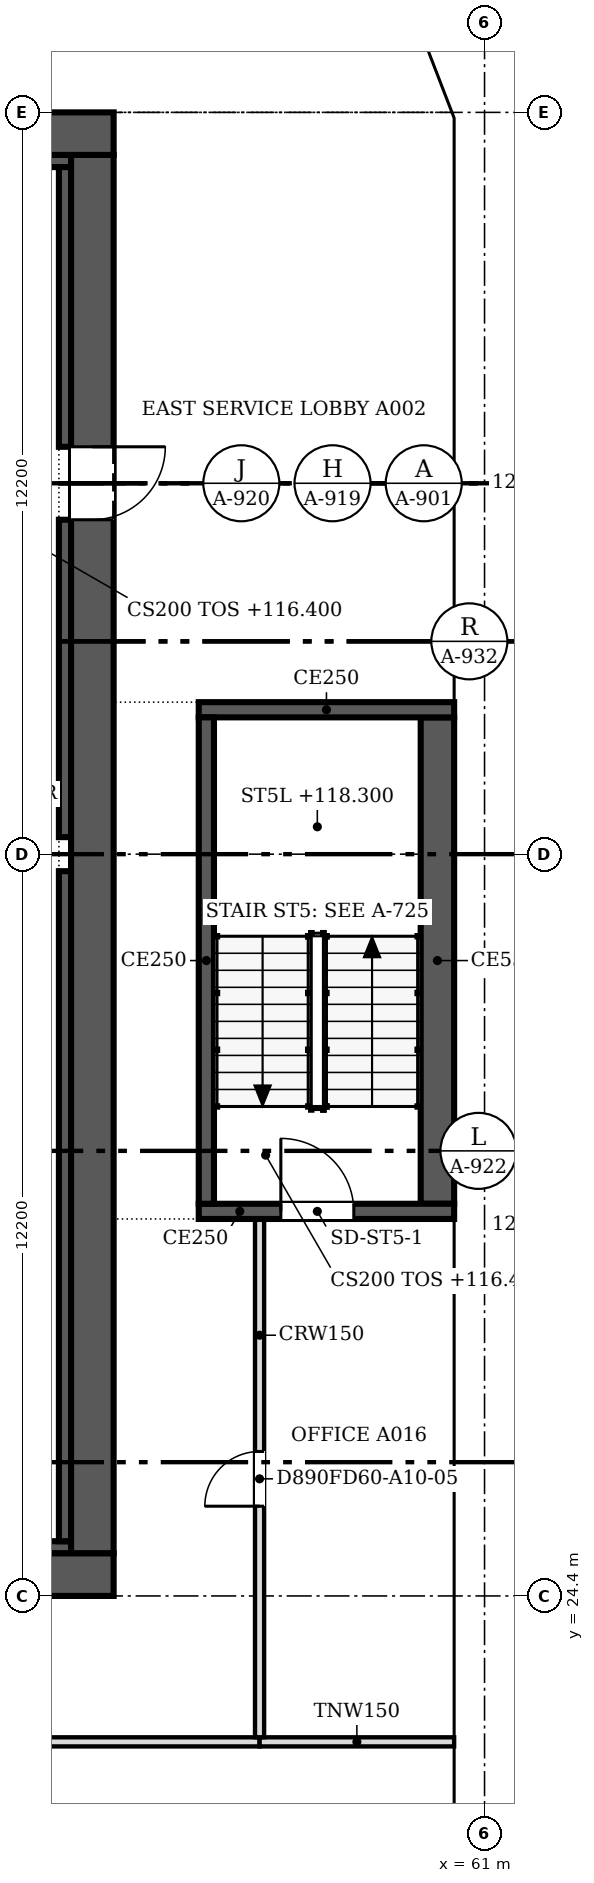
"""IFC4 building model, lengths in metres.
Left out: names, types, materials, properties, quantities, classifications, styles, units other than length and angle.
Written with IfcOpenShell. Run it as: python <this file> out.ifc"""

import sys

from ifc_helpers import new_model, si_unit, direction, frame, frame_2d, origin, place, context, subcontext, project, spatial, polyline, rectangle, outline, extrude, faceted_brep, source, transform, mapped, element, fill, save


model = new_model("IFC4")
c1 = context("Model", 3, precision=1e-05, world=origin(), true_north=direction((0.0, 1.0)))
c2 = subcontext(c1, "Body", "Model", "MODEL_VIEW")
j1 = project(units=[si_unit("LENGTHUNIT", "METRE"), si_unit("PLANEANGLEUNIT", "RADIAN")], contexts=[c1])
p1 = place(None, origin())
s1 = spatial("IfcSite", under=j1, at=p1, CompositionType="ELEMENT")
p2 = place(p1, origin())
s2 = spatial("IfcBuilding", under=s1, at=p2, CompositionType="ELEMENT")
p3 = place(p2, frame((0.0, 0.0, 116.4)))
s3 = spatial("IfcBuildingStorey", under=s2, at=p3, CompositionType="ELEMENT", Elevation=116.4)
m1 = source(origin(), c2, "Body", "SweptSolid", [
    extrude(outline(polyline([(3.05, 0.0), (6.1, 3.8), (3.05, 7.6), (0.0, 3.8), (3.05, 0.0)])), frame((0.0, 0.25, 0.0), z_axis=(0.0, -1.0, 0.0), x_axis=(1.0, 0.0, 0.0)), (0.0, 0.0, 1.0), 0.5),
])
p4 = place(p3, frame((60.75, 15.25, -3.8), z_axis=(0.0, 0.0, 1.0), x_axis=(0.0, 1.0, 0.0)))
e1 = element("IfcWall", 1, at=p4, inside=s3, PredefinedType="SOLIDWALL", context=c2, shape_type="MappedRepresentation", body=[
    mapped(m1, transform((0.0, 0.0, 0.0), scale=1.0)),
])
m2 = source(origin(), c2, "Body", "SweptSolid", [
    extrude(outline(polyline([(3.05, 0.399), (5.78, 3.8), (3.05, 7.2), (0.321, 3.8), (3.05, 0.399)])), frame((0.0, 0.26, 0.0), z_axis=(0.0, -1.0, 0.0), x_axis=(1.0, 0.0, 0.0)), (0.0, 0.0, 1.0), 0.52),
])
p5 = place(p4, origin())
e2 = element("IfcOpeningElement", 2, at=p5, cuts=e1, PredefinedType="OPENING", context=c2, shape_type="MappedRepresentation", body=[
    mapped(m2, transform((0.0, 0.0, 0.0), scale=1.0)),
])
m3 = source(origin(), c2, "Body", "Brep", [
    faceted_brep([(3.05, -0.25, 0.0), (6.1, -0.25, 3.8), (6.1, -0.25, 3.8), (3.05, -0.25, 7.6), (0.0, -0.25, 3.8), (0.0, 0.25, 3.8), (3.05, 0.25, 7.6), (6.1, 0.25, 3.8), (6.1, 0.25, 3.8), (3.05, 0.25, 0.0)], [[[0, 1, 2, 3, 4]], [[5, 6, 7, 8, 9]], [[9, 8, 1, 0]], [[7, 6, 3, 2]], [[6, 5, 4, 3]], [[5, 9, 0, 4]], [[1, 8, 7, 2]]]),
])
p6 = place(p3, frame((60.75, 21.35, -3.8), z_axis=(0.0, 0.0, 1.0), x_axis=(0.0, 1.0, 0.0)))
e3 = element("IfcWall", 3, at=p6, inside=s3, PredefinedType="SOLIDWALL", context=c2, shape_type="MappedRepresentation", body=[
    mapped(m3, transform((0.0, 0.0, 0.0), scale=1.0)),
])
p7 = place(p6, origin())
e4 = element("IfcOpeningElement", 4, at=p7, cuts=e3, PredefinedType="OPENING", context=c2, shape_type="MappedRepresentation", body=[
    mapped(m2, transform((0.0, 0.0, 0.0), scale=1.0)),
])
p8 = place(p3, frame((60.75, 27.45, -3.8), z_axis=(0.0, 0.0, 1.0), x_axis=(0.0, 1.0, 0.0)))
e5 = element("IfcWall", 5, at=p8, inside=s3, PredefinedType="SOLIDWALL", context=c2, shape_type="MappedRepresentation", body=[
    mapped(m1, transform((0.0, 0.0, 0.0), scale=1.0)),
])
p9 = place(p8, origin())
e6 = element("IfcOpeningElement", 6, at=p9, cuts=e5, PredefinedType="OPENING", context=c2, shape_type="MappedRepresentation", body=[
    mapped(m2, transform((0.0, 0.0, 0.0), scale=1.0)),
])
p10 = place(p3, frame((60.75, 33.55, -3.8), z_axis=(0.0, 0.0, 1.0), x_axis=(0.0, 1.0, 0.0)))
e7 = element("IfcWall", 7, at=p10, inside=s3, PredefinedType="SOLIDWALL", context=c2, shape_type="MappedRepresentation", body=[
    mapped(m3, transform((0.0, 0.0, 0.0), scale=1.0)),
])
p11 = place(p10, origin())
e8 = element("IfcOpeningElement", 8, at=p11, cuts=e7, PredefinedType="OPENING", context=c2, shape_type="MappedRepresentation", body=[
    mapped(m2, transform((0.0, 0.0, 0.0), scale=1.0)),
])
p12 = place(p3, frame((60.75, 39.65, -3.8), z_axis=(0.0, 0.0, 1.0), x_axis=(0.0, 1.0, 0.0)))
e9 = element("IfcWall", 9, at=p12, inside=s3, PredefinedType="SOLIDWALL", context=c2, shape_type="MappedRepresentation", body=[
    mapped(m1, transform((0.0, 0.0, 0.0), scale=1.0)),
])
p13 = place(p12, origin())
e10 = element("IfcOpeningElement", 10, at=p13, cuts=e9, PredefinedType="OPENING", context=c2, shape_type="MappedRepresentation", body=[
    mapped(m2, transform((0.0, 0.0, 0.0), scale=1.0)),
])
m4 = source(origin(), c2, "Body", "Brep", [
    faceted_brep([(3.003, -0.25, 0.0), (3.05, -0.25, 0.06), (3.05, -0.25, 7.54), (3.003, -0.25, 7.6), (0.0, -0.25, 3.8), (0.0, 0.25, 3.8), (2.957, 0.25, 7.541), (2.957, 0.25, 0.059), (3.003, 0.0, 0.0), (3.003, 0.0, 7.6)], [[[0, 1, 2, 3, 4]], [[5, 6, 7]], [[1, 0, 8]], [[9, 3, 2]], [[6, 5, 4, 3, 9]], [[5, 7, 8, 0, 4]], [[1, 8, 7, 6, 9, 2]]]),
])
p14 = place(p3, frame((60.75, 45.75, -3.8), z_axis=(0.0, 0.0, 1.0), x_axis=(0.0, 1.0, 0.0)))
e11 = element("IfcWall", 11, at=p14, inside=s3, PredefinedType="SOLIDWALL", context=c2, shape_type="MappedRepresentation", body=[
    mapped(m4, transform((0.0, 0.0, 0.0), scale=1.0)),
])
m5 = source(origin(), c2, "Body", "SweptSolid", [
    extrude(outline(polyline([(2.803, 6.944), (0.319, 3.8), (2.803, 0.656), (2.803, 6.944)])), frame((0.0, 0.26, 0.0), z_axis=(0.0, -1.0, 0.0), x_axis=(1.0, 0.0, 0.0)), (0.0, 0.0, 1.0), 0.52),
])
p15 = place(p14, origin())
e12 = element("IfcOpeningElement", 12, at=p15, cuts=e11, PredefinedType="OPENING", context=c2, shape_type="MappedRepresentation", body=[
    mapped(m5, transform((0.0, 0.0, 0.0), scale=1.0)),
])
m6 = source(origin(), c2, "Body", "Brep", [
    faceted_brep([(0.047, -0.25, 0.0), (2.997, -0.25, 3.8), (0.047, -0.25, 7.6), (0.0, -0.25, 7.541), (0.0, -0.25, 0.059), (0.093, 0.25, 7.54), (2.944, 0.25, 3.868), (2.944, 0.25, 3.732), (0.093, 0.25, 0.06), (2.997, 0.0, 3.8), (0.047, 0.0, 0.0), (0.047, 0.0, 7.6)], [[[0, 1, 2, 3, 4]], [[5, 6, 7, 8]], [[8, 7, 9, 1, 0, 10]], [[6, 5, 11, 2, 1, 9]], [[3, 2, 11]], [[10, 0, 4]], [[8, 10, 4, 3, 11, 5]], [[9, 7, 6]]]),
])
p16 = place(p3, frame((60.767, 48.71, -3.8), z_axis=(0.0, 0.0, 1.0), x_axis=(-0.359901446078, 0.932990326376, 0.0)))
e13 = element("IfcWall", 13, at=p16, inside=s3, PredefinedType="SOLIDWALL", context=c2, shape_type="MappedRepresentation", body=[
    mapped(m6, transform((0.0, 0.0, 0.0), scale=1.0)),
])
m7 = source(origin(), c2, "Body", "SweptSolid", [
    extrude(outline(polyline([(0.247, 0.665), (2.681, 3.8), (0.247, 6.935), (0.247, 0.665)])), frame((0.0, 0.26, 0.0), z_axis=(0.0, -1.0, 0.0), x_axis=(1.0, 0.0, 0.0)), (0.0, 0.0, 1.0), 0.52),
])
p17 = place(p16, origin())
e14 = element("IfcOpeningElement", 14, at=p17, cuts=e13, PredefinedType="OPENING", context=c2, shape_type="MappedRepresentation", body=[
    mapped(m7, transform((0.0, 0.0, 0.0), scale=1.0)),
])
p18 = place(p2, frame((0.0, 0.0, 120.2)))
s4 = spatial("IfcBuildingStorey", under=s2, at=p18, CompositionType="ELEMENT", Elevation=120.2)
m8 = source(origin(), c2, "Body", "Brep", [
    faceted_brep([(3.05, -0.25, 0.0), (6.1, -0.25, 3.8), (6.1, -0.25, 3.8), (3.05, -0.25, 7.6), (0.0, -0.25, 3.8), (0.0, 0.25, 3.8), (3.05, 0.25, 7.6), (6.1, 0.25, 3.8), (6.1, 0.25, 3.8), (3.05, 0.25, 0.0)], [[[0, 1, 2, 3, 4]], [[5, 6, 7, 8, 9]], [[9, 8, 1, 0]], [[7, 6, 3, 2]], [[6, 5, 4, 3]], [[5, 9, 0, 4]], [[1, 8, 7, 2]]]),
])
p19 = place(p18, frame((60.75, 18.3, -3.8), z_axis=(0.0, 0.0, 1.0), x_axis=(0.0, 1.0, 0.0)))
e15 = element("IfcWall", 15, at=p19, inside=s4, PredefinedType="SOLIDWALL", context=c2, shape_type="MappedRepresentation", body=[
    mapped(m8, transform((0.0, 0.0, 0.0), scale=1.0)),
])
m9 = source(origin(), c2, "Body", "SweptSolid", [
    extrude(outline(polyline([(3.05, 0.399), (5.78, 3.8), (3.05, 7.201), (0.321, 3.8), (3.05, 0.399)])), frame((0.0, 0.26, 0.0), z_axis=(0.0, -1.0, 0.0), x_axis=(1.0, 0.0, 0.0)), (0.0, 0.0, 1.0), 0.52),
])
p20 = place(p19, origin())
e16 = element("IfcOpeningElement", 16, at=p20, cuts=e15, PredefinedType="OPENING", context=c2, shape_type="MappedRepresentation", body=[
    mapped(m9, transform((0.0, 0.0, 0.0), scale=1.0)),
])
m10 = source(origin(), c2, "Body", "SweptSolid", [
    extrude(outline(polyline([(3.05, 0.0), (6.1, 3.8), (3.05, 7.6), (0.0, 3.8), (3.05, 0.0)])), frame((0.0, 0.25, 0.0), z_axis=(0.0, -1.0, 0.0), x_axis=(1.0, 0.0, 0.0)), (0.0, 0.0, 1.0), 0.5),
])
p21 = place(p18, frame((60.75, 24.4, -3.8), z_axis=(0.0, 0.0, 1.0), x_axis=(0.0, 1.0, 0.0)))
e17 = element("IfcWall", 17, at=p21, inside=s4, PredefinedType="SOLIDWALL", context=c2, shape_type="MappedRepresentation", body=[
    mapped(m10, transform((0.0, 0.0, 0.0), scale=1.0)),
])
p22 = place(p21, origin())
e18 = element("IfcOpeningElement", 18, at=p22, cuts=e17, PredefinedType="OPENING", context=c2, shape_type="MappedRepresentation", body=[
    mapped(m9, transform((0.0, 0.0, 0.0), scale=1.0)),
])
p23 = place(p18, frame((60.75, 30.5, -3.8), z_axis=(0.0, 0.0, 1.0), x_axis=(0.0, 1.0, 0.0)))
e19 = element("IfcWall", 19, at=p23, inside=s4, PredefinedType="SOLIDWALL", context=c2, shape_type="MappedRepresentation", body=[
    mapped(m10, transform((0.0, 0.0, 0.0), scale=1.0)),
])
p24 = place(p23, origin())
e20 = element("IfcOpeningElement", 20, at=p24, cuts=e19, PredefinedType="OPENING", context=c2, shape_type="MappedRepresentation", body=[
    mapped(m9, transform((0.0, 0.0, 0.0), scale=1.0)),
])
p25 = place(p18, frame((60.75, 36.6, -3.8), z_axis=(0.0, 0.0, 1.0), x_axis=(0.0, 1.0, 0.0)))
e21 = element("IfcWall", 21, at=p25, inside=s4, PredefinedType="SOLIDWALL", context=c2, shape_type="MappedRepresentation", body=[
    mapped(m8, transform((0.0, 0.0, 0.0), scale=1.0)),
])
p26 = place(p25, origin())
e22 = element("IfcOpeningElement", 22, at=p26, cuts=e21, PredefinedType="OPENING", context=c2, shape_type="MappedRepresentation", body=[
    mapped(m9, transform((0.0, 0.0, 0.0), scale=1.0)),
])
m11 = source(origin(), c2, "Body", "Brep", [
    faceted_brep([(3.05, -0.25, 0.0), (6.053, -0.25, 3.8), (3.05, -0.25, 7.6), (0.0, -0.25, 3.8), (0.0, 0.25, 3.8), (3.05, 0.25, 7.6), (6.007, 0.25, 3.859), (6.007, 0.25, 3.741), (3.05, 0.25, 0.0), (6.053, 0.0, 3.8)], [[[0, 1, 2, 3]], [[4, 5, 6, 7, 8]], [[8, 7, 9, 1, 0]], [[6, 5, 2, 1, 9]], [[5, 4, 3, 2]], [[4, 8, 0, 3]], [[9, 7, 6]]]),
])
p27 = place(p18, frame((60.75, 42.7, -3.8), z_axis=(0.0, 0.0, 1.0), x_axis=(0.0, 1.0, 0.0)))
e23 = element("IfcWall", 23, at=p27, inside=s4, PredefinedType="SOLIDWALL", context=c2, shape_type="MappedRepresentation", body=[
    mapped(m11, transform((0.0, 0.0, 0.0), scale=1.0)),
])
m12 = source(origin(), c2, "Body", "SweptSolid", [
    extrude(outline(polyline([(3.049, 0.401), (5.735, 3.8), (3.049, 7.199), (0.321, 3.8), (3.049, 0.401)])), frame((0.0, 0.26, 0.0), z_axis=(0.0, -1.0, 0.0), x_axis=(1.0, 0.0, 0.0)), (0.0, 0.0, 1.0), 0.52),
])
p28 = place(p27, origin())
e24 = element("IfcOpeningElement", 24, at=p28, cuts=e23, PredefinedType="OPENING", context=c2, shape_type="MappedRepresentation", body=[
    mapped(m12, transform((0.0, 0.0, 0.0), scale=1.0)),
])
m13 = source(origin(), c2, "Body", "Brep", [
    faceted_brep([(2.95, -0.25, 0.0), (3.003, -0.25, 0.068), (3.003, -0.25, 7.532), (2.95, -0.25, 7.6), (0.0, -0.25, 3.8), (0.047, 0.25, 3.86), (2.898, 0.25, 7.532), (2.898, 0.25, 0.068), (0.047, 0.25, 3.74), (2.95, 0.0, 0.0), (2.95, 0.0, 7.6), (0.0, 0.0, 3.8)], [[[0, 1, 2, 3, 4]], [[5, 6, 7, 8]], [[1, 0, 9]], [[10, 3, 2]], [[6, 5, 11, 4, 3, 10]], [[8, 7, 9, 0, 4, 11]], [[8, 11, 5]], [[1, 9, 7, 6, 10, 2]]]),
])
p29 = place(p18, frame((60.75, 48.753, -3.8), z_axis=(0.0, 0.0, 1.0), x_axis=(-0.35992665181, 0.932980602862, 0.0)))
e25 = element("IfcWall", 25, at=p29, inside=s4, PredefinedType="SOLIDWALL", context=c2, shape_type="MappedRepresentation", body=[
    mapped(m13, transform((0.0, 0.0, 0.0), scale=1.0)),
])
m14 = source(origin(), c2, "Body", "SweptSolid", [
    extrude(outline(polyline([(2.75, 6.935), (0.316, 3.8), (2.75, 0.665), (2.75, 6.935)])), frame((0.0, 0.26, 0.0), z_axis=(0.0, -1.0, 0.0), x_axis=(1.0, 0.0, 0.0)), (0.0, 0.0, 1.0), 0.52),
])
p30 = place(p29, origin())
e26 = element("IfcOpeningElement", 26, at=p30, cuts=e25, PredefinedType="OPENING", context=c2, shape_type="MappedRepresentation", body=[
    mapped(m14, transform((0.0, 0.0, 0.0), scale=1.0)),
])
p31 = place(p3, frame((54.9, 24.75, 0.0), z_axis=(0.0, 0.0, 1.0), x_axis=(-1.0, 0.0, 0.0)))
e27 = element("IfcWall", 27, at=p31, inside=s3, PredefinedType="SHEAR", context=c2, shape_type="SweptSolid", body=[
    extrude(rectangle(XDim=24.4, YDim=0.7, at=frame_2d((12.2, 0.0))), origin(), (0.0, 0.0, 1.0), 3.8),
])
m15 = source(origin(), c2, "Body", "SweptSolid", [
    extrude(rectangle(XDim=1.2, YDim=2.1, at=frame_2d((0.6, 1.05))), frame((0.0, 0.36, 0.0), z_axis=(0.0, -1.0, 0.0), x_axis=(1.0, 0.0, 0.0)), (0.0, 0.0, 1.0), 0.72),
])
p32 = place(p31, frame((1.5, 0.0, 0.0)))
e28 = element("IfcOpeningElement", 28, at=p32, cuts=e27, PredefinedType="OPENING", context=c2, shape_type="MappedRepresentation", body=[
    mapped(m15, transform((0.0, 0.0, 0.0), scale=1.0)),
])
p33 = place(p3, frame((30.5, 48.45, 0.0), z_axis=(0.0, 0.0, 1.0), x_axis=(1.0, 0.0, 0.0)))
e29 = element("IfcWall", 29, at=p33, inside=s3, PredefinedType="SHEAR", context=c2, shape_type="SweptSolid", body=[
    extrude(rectangle(XDim=24.4, YDim=0.7, at=frame_2d((12.2, 0.0))), origin(), (0.0, 0.0, 1.0), 3.8),
])
p34 = place(p3, frame((54.55, 48.1, 0.0), z_axis=(0.0, 0.0, 1.0), x_axis=(0.0, -1.0, 0.0)))
e30 = element("IfcWall", 30, at=p34, inside=s3, PredefinedType="SHEAR", context=c2, shape_type="SweptSolid", body=[
    extrude(rectangle(XDim=23.0, YDim=0.7, at=frame_2d((11.5, 0.0))), origin(), (0.0, 0.0, 1.0), 3.8),
])
p35 = place(p34, frame((4.8, 0.0, 0.0)))
e31 = element("IfcOpeningElement", 31, at=p35, cuts=e30, PredefinedType="OPENING", context=c2, shape_type="MappedRepresentation", body=[
    mapped(m15, transform((0.0, 0.0, 0.0), scale=1.0)),
])
p36 = place(p3, frame((53.4, 25.2, 0.0), z_axis=(0.0, 0.0, 1.0), x_axis=(1.0, 0.0, 0.0)))
e32 = element("IfcWall", 32, at=p36, inside=s3, PredefinedType="SOLIDWALL", context=c2, shape_type="SweptSolid", body=[
    extrude(rectangle(XDim=0.8, YDim=0.2, at=frame_2d((0.4, 0.0))), origin(), (0.0, 0.0, 1.0), 3.8),
])
p37 = place(p3, frame((31.2, 48.0, 0.0), z_axis=(0.0, 0.0, 1.0), x_axis=(1.0, 0.0, 0.0)))
e33 = element("IfcWall", 33, at=p37, inside=s3, PredefinedType="SOLIDWALL", context=c2, shape_type="SweptSolid", body=[
    extrude(rectangle(XDim=23.0, YDim=0.2, at=frame_2d((11.5, 0.0))), origin(), (0.0, 0.0, 1.0), 3.8),
])
p38 = place(p3, frame((54.1, 25.3, 0.0), z_axis=(0.0, 0.0, 1.0), x_axis=(0.0, 1.0, 0.0)))
e34 = element("IfcWall", 34, at=p38, inside=s3, PredefinedType="SOLIDWALL", context=c2, shape_type="SweptSolid", body=[
    extrude(rectangle(XDim=11.02, YDim=0.2, at=frame_2d((5.51, 0.0))), origin(), (0.0, 0.0, 1.0), 3.8),
])
p39 = place(p3, frame((54.1, 36.88, 0.0), z_axis=(0.0, 0.0, 1.0), x_axis=(0.0, 1.0, 0.0)))
e35 = element("IfcWall", 35, at=p39, inside=s3, PredefinedType="SOLIDWALL", context=c2, shape_type="SweptSolid", body=[
    extrude(rectangle(XDim=5.22, YDim=0.2, at=frame_2d((2.61, 0.0))), origin(), (0.0, 0.0, 1.0), 3.8),
])
p40 = place(p3, frame((54.1, 43.3, 0.0), z_axis=(0.0, 0.0, 1.0), x_axis=(0.0, 1.0, 0.0)))
e36 = element("IfcWall", 36, at=p40, inside=s3, PredefinedType="SOLIDWALL", context=c2, shape_type="SweptSolid", body=[
    extrude(rectangle(XDim=4.6, YDim=0.2, at=frame_2d((2.3, 0.0))), origin(), (0.0, 0.0, 1.0), 3.8),
])
p41 = place(p3, frame((60.5, 30.725, 0.0), z_axis=(0.0, 0.0, 1.0), x_axis=(-1.0, 0.0, 0.0)))
e37 = element("IfcWall", 37, at=p41, inside=s3, PredefinedType="SOLIDWALL", context=c2, shape_type="SweptSolid", body=[
    extrude(rectangle(XDim=4.2, YDim=0.25, at=frame_2d((2.1, 0.0))), origin(), (0.0, 0.0, 1.0), 3.8),
])
m16 = source(origin(), c2, "Body", "SweptSolid", [
    extrude(rectangle(XDim=1.2, YDim=2.1, at=frame_2d((0.6, 1.05))), frame((0.0, 0.135, 0.0), z_axis=(0.0, -1.0, 0.0), x_axis=(1.0, 0.0, 0.0)), (0.0, 0.0, 1.0), 0.27),
])
p42 = place(p41, frame((1.65, 0.0, 0.0)))
e38 = element("IfcOpeningElement", 38, at=p42, cuts=e37, PredefinedType="OPENING", context=c2, shape_type="MappedRepresentation", body=[
    mapped(m16, transform((0.0, 0.0, 0.0), scale=1.0)),
])
p43 = place(p3, frame((56.425, 30.85, 0.0), z_axis=(0.0, 0.0, 1.0), x_axis=(0.0, 1.0, 0.0)))
e39 = element("IfcWall", 39, at=p43, inside=s3, PredefinedType="SOLIDWALL", context=c2, shape_type="SweptSolid", body=[
    extrude(rectangle(XDim=8.0, YDim=0.25, at=frame_2d((4.0, 0.0))), origin(), (0.0, 0.0, 1.0), 3.8),
])
p44 = place(p3, frame((56.3, 38.975, 0.0), z_axis=(0.0, 0.0, 1.0), x_axis=(1.0, 0.0, 0.0)))
e40 = element("IfcWall", 40, at=p44, inside=s3, PredefinedType="SOLIDWALL", context=c2, shape_type="SweptSolid", body=[
    extrude(rectangle(XDim=4.2, YDim=0.25, at=frame_2d((2.1, 0.0))), origin(), (0.0, 0.0, 1.0), 3.8),
])
p45 = place(p3, frame((60.225, 38.85, 0.0), z_axis=(0.0, 0.0, 1.0), x_axis=(0.0, -1.0, 0.0)))
e41 = element("IfcWall", 41, at=p45, inside=s3, PredefinedType="SOLIDWALL", context=c2, shape_type="SweptSolid", body=[
    extrude(rectangle(XDim=8.0, YDim=0.55, at=frame_2d((4.0, 0.0))), origin(), (0.0, 0.0, 1.0), 3.8),
])
p46 = place(p3, frame((46.4, 22.0, 0.0), z_axis=(0.0, 0.0, 1.0), x_axis=(1.0, 0.0, 0.0)))
e42 = element("IfcWall", 42, at=p46, inside=s3, PredefinedType="PARTITIONING", context=c2, shape_type="SweptSolid", body=[
    extrude(rectangle(XDim=10.9, YDim=0.15, at=frame_2d((5.45, 0.0))), origin(), (0.0, 0.0, 1.0), 3.067),
])
p47 = place(p3, frame((57.301, 22.0, 0.0), z_axis=(0.0, 0.0, 1.0), x_axis=(1.0, 0.0, 0.0)))
e43 = element("IfcWall", 43, at=p47, inside=s3, PredefinedType="PARTITIONING", context=c2, shape_type="SweptSolid", body=[
    extrude(rectangle(XDim=3.199, YDim=0.15, at=frame_2d((1.6, 0.0))), origin(), (0.0, 0.0, 1.0), 3.067),
])
p48 = place(p3, frame((57.3, 30.6, 0.0), z_axis=(0.0, 0.0, 1.0), x_axis=(0.0, -1.0, 0.0)))
e44 = element("IfcWall", 44, at=p48, inside=s3, PredefinedType="PARTITIONING", context=c2, shape_type="SweptSolid", body=[
    extrude(rectangle(XDim=8.524, YDim=0.15, at=frame_2d((4.262, 0.0))), origin(), (0.0, 0.0, 1.0), 3.067),
])
m17 = source(origin(), c2, "Body", "SweptSolid", [
    extrude(rectangle(XDim=0.9, YDim=2.1, at=frame_2d((0.45, 1.05))), frame((0.0, 0.085, 0.0), z_axis=(0.0, -1.0, 0.0), x_axis=(1.0, 0.0, 0.0)), (0.0, 0.0, 1.0), 0.17),
])
p49 = place(p48, frame((3.824, 0.0, 0.0)))
e45 = element("IfcOpeningElement", 45, at=p49, cuts=e44, PredefinedType="OPENING", context=c2, shape_type="MappedRepresentation", body=[
    mapped(m17, transform((0.0, 0.0, 0.0), scale=1.0)),
])
m18 = source(origin(), c2, "Body", "SweptSolid", [
    extrude(rectangle(XDim=1.2, YDim=2.1, at=frame_2d((0.6, 1.05))), frame((0.0, 0.025, 0.0), z_axis=(0.0, -1.0, 0.0), x_axis=(1.0, 0.0, 0.0)), (0.0, 0.0, 1.0), 0.05),
])
p50 = place(p35, origin())
e46 = element("IfcDoor", 46, at=p50, inside=s3, OperationType="SINGLE_SWING_LEFT", PredefinedType="DOOR", context=c2, shape_type="MappedRepresentation", body=[
    mapped(m18, transform((0.0, 0.0, 0.0), scale=1.0)),
])
fill(e31, e46)
p51 = place(p42, origin())
e47 = element("IfcDoor", 47, at=p51, inside=s3, OperationType="SINGLE_SWING_RIGHT", PredefinedType="DOOR", context=c2, shape_type="MappedRepresentation", body=[
    mapped(m18, transform((0.0, 0.0, 0.0), scale=1.0)),
])
fill(e38, e47)
m19 = source(origin(), c2, "Body", "SweptSolid", [
    extrude(rectangle(XDim=0.9, YDim=2.1, at=frame_2d((0.45, 1.05))), frame((0.0, 0.025, 0.0), z_axis=(0.0, -1.0, 0.0), x_axis=(1.0, 0.0, 0.0)), (0.0, 0.0, 1.0), 0.05),
])
p52 = place(p49, origin())
e48 = element("IfcDoor", 48, at=p52, inside=s3, OperationType="SINGLE_SWING_RIGHT", PredefinedType="DOOR", context=c2, shape_type="MappedRepresentation", body=[
    mapped(m19, transform((0.0, 0.0, 0.0), scale=1.0)),
])
fill(e45, e48)
save(model, sys.argv[1])
